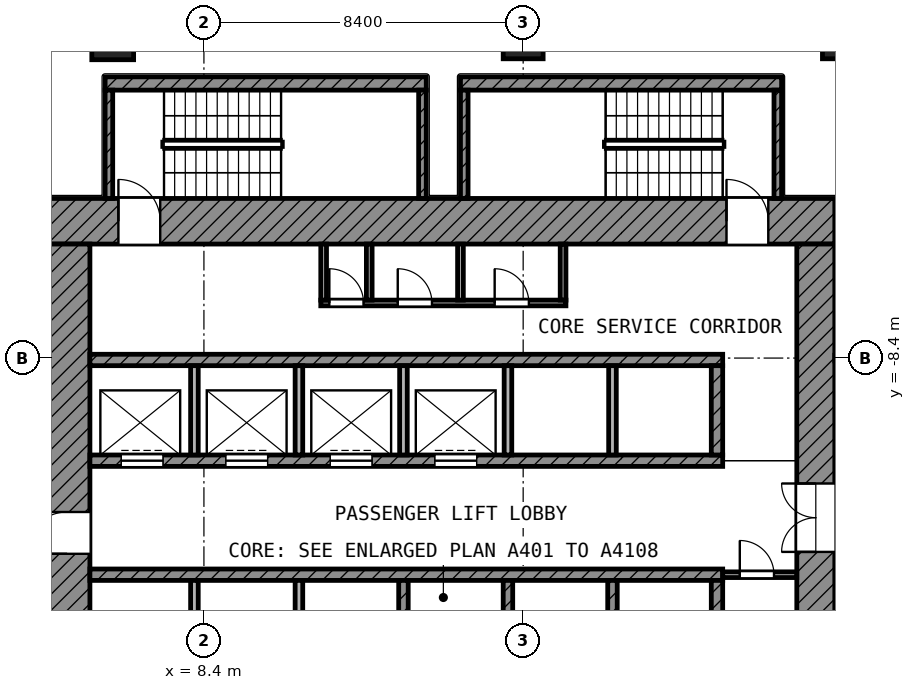
"""IFC4 building model, lengths in metres.
Left out: names, types, materials, properties, quantities, classifications, styles, units other than length and angle.
Written with IfcOpenShell. Run it as: python <this file> out.ifc"""

import sys

from ifc_helpers import new_model, si_unit, direction, frame, frame_2d, origin, origin_2d, place, context, subcontext, project, spatial, rectangle, extrude, element, fill, save


model = new_model("IFC4")
c1 = context("Model", 3, precision=1e-05, world=origin(), true_north=direction((0.0, 1.0)))
c2 = subcontext(c1, "Body", "Model", "MODEL_VIEW")
j1 = project(units=[si_unit("LENGTHUNIT", "METRE"), si_unit("PLANEANGLEUNIT", "RADIAN")], contexts=[c1])
p1 = place(None, origin())
s1 = spatial("IfcSite", under=j1, at=p1, CompositionType="ELEMENT")
p2 = place(p1, origin())
s2 = spatial("IfcBuilding", under=s1, at=p2, CompositionType="ELEMENT")
p3 = place(p2, frame((0.0, 0.0, 136.6)))
s3 = spatial("IfcBuildingStorey", under=s2, at=p3, CompositionType="ELEMENT", Elevation=136.6)
p4 = place(p3, frame((6.0, 0.0, 0.0), z_axis=(0.0, 0.0, 1.0), x_axis=(1.0, 0.0, 0.0)))
e1 = element("IfcColumn", 1, at=p4, inside=s3, PredefinedType="COLUMN", context=c2, shape_type="SweptSolid", body=[
    extrude(rectangle(XDim=1.1, YDim=1.1, at=origin_2d()), origin(), (0.0, 0.0, 1.0), 4.2),
])
for number, where, z_axis, x_axis in (
    (2, (16.8, 0.0, 0.0), (0.0, 0.0, 1.0), (1.0, 0.0, 0.0)),
    (3, (25.2, 0.0, 0.0), (0.0, 0.0, 1.0), (1.0, 0.0, 0.0)),
):
    element("IfcColumn", number, at=place(p3, frame(where, z_axis=z_axis, x_axis=x_axis)), inside=s3, PredefinedType="COLUMN", context=c2, shape_type="SweptSolid", body=[
        extrude(rectangle(XDim=1.05, YDim=1.05, at=origin_2d()), origin(), (0.0, 0.0, 1.0), 4.2),
    ])
p5 = place(p3, frame((4.2, -4.8, 0.0), z_axis=(0.0, 0.0, 1.0), x_axis=(1.0, 0.0, 0.0)))
e4 = element("IfcWall", 4, at=p5, inside=s3, PredefinedType="SHEAR", context=c2, shape_type="SweptSolid", body=[
    extrude(rectangle(XDim=20.8, YDim=1.2, at=frame_2d((10.4, 0.0))), origin(), (0.0, 0.0, 1.0), 3.6),
])
p6 = place(p5, frame((1.95, 0.0, 0.0)))
e5 = element("IfcOpeningElement", 5, at=p6, cuts=e4, PredefinedType="OPENING", context=c2, shape_type="SweptSolid", body=[
    extrude(rectangle(XDim=1.1, YDim=2.1, at=frame_2d((0.55, 1.05))), frame((0.0, 0.61, 0.0), z_axis=(0.0, -1.0, 0.0), x_axis=(1.0, 0.0, 0.0)), (0.0, 0.0, 1.0), 1.22),
])
p7 = place(p5, frame((17.95, 0.0, 0.0)))
e6 = element("IfcOpeningElement", 6, at=p7, cuts=e4, PredefinedType="OPENING", context=c2, shape_type="SweptSolid", body=[
    extrude(rectangle(XDim=1.1, YDim=2.1, at=frame_2d((0.55, 1.05))), frame((0.0, 0.61, 0.0), z_axis=(0.0, -1.0, 0.0), x_axis=(1.0, 0.0, 0.0)), (0.0, 0.0, 1.0), 1.22),
])
p8 = place(p3, frame((4.8, -25.0, 0.0), z_axis=(0.0, 0.0, 1.0), x_axis=(0.0, 1.0, 0.0)))
e7 = element("IfcWall", 7, at=p8, inside=s3, PredefinedType="SHEAR", context=c2, shape_type="SweptSolid", body=[
    extrude(rectangle(XDim=19.6, YDim=1.2, at=frame_2d((9.8, 0.0))), origin(), (0.0, 0.0, 1.0), 3.6),
])
p9 = place(p8, frame((11.45, 0.0, 0.0)))
e8 = element("IfcOpeningElement", 8, at=p9, cuts=e7, PredefinedType="OPENING", context=c2, shape_type="SweptSolid", body=[
    extrude(rectangle(XDim=1.1, YDim=2.1, at=frame_2d((0.55, 1.05))), frame((0.0, 0.61, 0.0), z_axis=(0.0, -1.0, 0.0), x_axis=(1.0, 0.0, 0.0)), (0.0, 0.0, 1.0), 1.22),
])
p10 = place(p8, frame((2.15, 0.0, 0.0)))
e9 = element("IfcOpeningElement", 9, at=p10, cuts=e7, PredefinedType="OPENING", context=c2, shape_type="SweptSolid", body=[
    extrude(rectangle(XDim=1.1, YDim=2.1, at=frame_2d((0.55, 1.05))), frame((0.0, 0.61, 0.0), z_axis=(0.0, -1.0, 0.0), x_axis=(1.0, 0.0, 0.0)), (0.0, 0.0, 1.0), 1.22),
])
p11 = place(p3, frame((24.5, -24.0, 0.0), z_axis=(0.0, 0.0, 1.0), x_axis=(0.0, 1.0, 0.0)))
e10 = element("IfcWall", 10, at=p11, inside=s3, PredefinedType="SHEAR", context=c2, shape_type="SweptSolid", body=[
    extrude(rectangle(XDim=18.6, YDim=1.0, at=frame_2d((9.3, 0.0))), origin(), (0.0, 0.0, 1.0), 3.6),
])
p12 = place(p11, frame((10.5, 0.0, 0.0)))
e11 = element("IfcOpeningElement", 11, at=p12, cuts=e10, PredefinedType="OPENING", context=c2, shape_type="SweptSolid", body=[
    extrude(rectangle(XDim=1.8, YDim=2.1, at=frame_2d((0.9, 1.05))), frame((0.0, 0.51, 0.0), z_axis=(0.0, -1.0, 0.0), x_axis=(1.0, 0.0, 0.0)), (0.0, 0.0, 1.0), 1.02),
])
p13 = place(p3, frame((5.4, -8.45, 0.0), z_axis=(0.0, 0.0, 1.0), x_axis=(1.0, 0.0, 0.0)))
e12 = element("IfcWall", 12, at=p13, inside=s3, PredefinedType="SHEAR", context=c2, shape_type="SweptSolid", body=[
    extrude(rectangle(XDim=16.65, YDim=0.3, at=frame_2d((8.325, 0.0))), origin(), (0.0, 0.0, 1.0), 3.6),
])
p14 = place(p3, frame((5.4, -11.1, 0.0), z_axis=(0.0, 0.0, 1.0), x_axis=(1.0, 0.0, 0.0)))
e13 = element("IfcWall", 13, at=p14, inside=s3, PredefinedType="SHEAR", context=c2, shape_type="SweptSolid", body=[
    extrude(rectangle(XDim=16.65, YDim=0.3, at=frame_2d((8.325, 0.0))), origin(), (0.0, 0.0, 1.0), 3.6),
])
p15 = place(p14, frame((0.825, 0.0, 0.0)))
e14 = element("IfcOpeningElement", 14, at=p15, cuts=e13, PredefinedType="OPENING", context=c2, shape_type="SweptSolid", body=[
    extrude(rectangle(XDim=1.1, YDim=2.1, at=frame_2d((0.55, 1.05))), frame((0.0, 0.16, 0.0), z_axis=(0.0, -1.0, 0.0), x_axis=(1.0, 0.0, 0.0)), (0.0, 0.0, 1.0), 0.32),
])
p16 = place(p14, frame((3.575, 0.0, 0.0)))
e15 = element("IfcOpeningElement", 15, at=p16, cuts=e13, PredefinedType="OPENING", context=c2, shape_type="SweptSolid", body=[
    extrude(rectangle(XDim=1.1, YDim=2.1, at=frame_2d((0.55, 1.05))), frame((0.0, 0.16, 0.0), z_axis=(0.0, -1.0, 0.0), x_axis=(1.0, 0.0, 0.0)), (0.0, 0.0, 1.0), 0.32),
])
p17 = place(p14, frame((6.325, 0.0, 0.0)))
e16 = element("IfcOpeningElement", 16, at=p17, cuts=e13, PredefinedType="OPENING", context=c2, shape_type="SweptSolid", body=[
    extrude(rectangle(XDim=1.1, YDim=2.1, at=frame_2d((0.55, 1.05))), frame((0.0, 0.16, 0.0), z_axis=(0.0, -1.0, 0.0), x_axis=(1.0, 0.0, 0.0)), (0.0, 0.0, 1.0), 0.32),
])
p18 = place(p14, frame((9.075, 0.0, 0.0)))
e17 = element("IfcOpeningElement", 17, at=p18, cuts=e13, PredefinedType="OPENING", context=c2, shape_type="SweptSolid", body=[
    extrude(rectangle(XDim=1.1, YDim=2.1, at=frame_2d((0.55, 1.05))), frame((0.0, 0.16, 0.0), z_axis=(0.0, -1.0, 0.0), x_axis=(1.0, 0.0, 0.0)), (0.0, 0.0, 1.0), 0.32),
])
p19 = place(p3, frame((5.4, -14.1, 0.0), z_axis=(0.0, 0.0, 1.0), x_axis=(1.0, 0.0, 0.0)))
e18 = element("IfcWall", 18, at=p19, inside=s3, PredefinedType="SHEAR", context=c2, shape_type="SweptSolid", body=[
    extrude(rectangle(XDim=16.65, YDim=0.3, at=frame_2d((8.325, 0.0))), origin(), (0.0, 0.0, 1.0), 3.6),
])
p20 = place(p3, frame((21.9, -10.95, 0.0), z_axis=(0.0, 0.0, 1.0), x_axis=(0.0, 1.0, 0.0)))
e19 = element("IfcWall", 19, at=p20, inside=s3, PredefinedType="SHEAR", context=c2, shape_type="SweptSolid", body=[
    extrude(rectangle(XDim=2.35, YDim=0.3, at=frame_2d((1.175, 0.0))), origin(), (0.0, 0.0, 1.0), 3.6),
])
p21 = place(p3, frame((21.9, -16.6, 0.0), z_axis=(0.0, 0.0, 1.0), x_axis=(0.0, 1.0, 0.0)))
e20 = element("IfcWall", 20, at=p21, inside=s3, PredefinedType="SHEAR", context=c2, shape_type="SweptSolid", body=[
    extrude(rectangle(XDim=2.35, YDim=0.3, at=frame_2d((1.175, 0.0))), origin(), (0.0, 0.0, 1.0), 3.6),
])
for number, where, z_axis, x_axis in (
    (21, (8.15, -10.95, 0.0), (0.0, 0.0, 1.0), (0.0, 1.0, 0.0)),
    (22, (10.9, -10.95, 0.0), (0.0, 0.0, 1.0), (0.0, 1.0, 0.0)),
    (23, (13.65, -10.95, 0.0), (0.0, 0.0, 1.0), (0.0, 1.0, 0.0)),
    (24, (16.4, -10.95, 0.0), (0.0, 0.0, 1.0), (0.0, 1.0, 0.0)),
    (25, (19.15, -10.95, 0.0), (0.0, 0.0, 1.0), (0.0, 1.0, 0.0)),
):
    element("IfcWall", number, at=place(p3, frame(where, z_axis=z_axis, x_axis=x_axis)), inside=s3, PredefinedType="PARTITIONING", context=c2, shape_type="SweptSolid", body=[
        extrude(rectangle(XDim=2.35, YDim=0.2, at=frame_2d((1.175, 0.0))), origin(), (0.0, 0.0, 1.0), 3.6),
    ])
for number, where, z_axis, x_axis in (
    (26, (8.15, -16.6, 0.0), (0.0, 0.0, 1.0), (0.0, 1.0, 0.0)),
    (27, (10.9, -16.6, 0.0), (0.0, 0.0, 1.0), (0.0, 1.0, 0.0)),
):
    element("IfcWall", number, at=place(p3, frame(where, z_axis=z_axis, x_axis=x_axis)), inside=s3, PredefinedType="PARTITIONING", context=c2, shape_type="SweptSolid", body=[
        extrude(rectangle(XDim=2.35, YDim=0.2, at=frame_2d((1.175, 0.0))), origin(), (0.0, 0.0, 1.0), 3.6),
    ])
for number, where, z_axis, x_axis in (
    (28, (13.65, -16.6, 0.0), (0.0, 0.0, 1.0), (0.0, 1.0, 0.0)),
    (29, (16.4, -16.6, 0.0), (0.0, 0.0, 1.0), (0.0, 1.0, 0.0)),
    (30, (19.15, -16.6, 0.0), (0.0, 0.0, 1.0), (0.0, 1.0, 0.0)),
):
    element("IfcWall", number, at=place(p3, frame(where, z_axis=z_axis, x_axis=x_axis)), inside=s3, PredefinedType="SHEAR", context=c2, shape_type="SweptSolid", body=[
        extrude(rectangle(XDim=2.35, YDim=0.25, at=frame_2d((1.175, 0.0))), origin(), (0.0, 0.0, 1.0), 3.6),
    ])
p22 = place(p3, frame((22.05, -14.1, 0.0), z_axis=(0.0, 0.0, 1.0), x_axis=(1.0, 0.0, 0.0)))
e31 = element("IfcWall", 31, at=p22, inside=s3, PredefinedType="PARTITIONING", context=c2, shape_type="SweptSolid", body=[
    extrude(rectangle(XDim=1.95, YDim=0.15, at=frame_2d((0.975, 0.0))), origin(), (0.0, 0.0, 1.0), 3.6),
])
p23 = place(p22, frame((0.45, 0.0, 0.0)))
e32 = element("IfcOpeningElement", 32, at=p23, cuts=e31, PredefinedType="OPENING", context=c2, shape_type="SweptSolid", body=[
    extrude(rectangle(XDim=0.9, YDim=2.1, at=frame_2d((0.45, 1.05))), frame((0.0, 0.085, 0.0), z_axis=(0.0, -1.0, 0.0), x_axis=(1.0, 0.0, 0.0)), (0.0, 0.0, 1.0), 0.17),
])
p24 = place(p3, frame((11.475, -6.95, 0.0), z_axis=(0.0, 0.0, 1.0), x_axis=(1.0, 0.0, 0.0)))
e33 = element("IfcWall", 33, at=p24, inside=s3, PredefinedType="PARTITIONING", context=c2, shape_type="SweptSolid", body=[
    extrude(rectangle(XDim=6.45, YDim=0.15, at=frame_2d((3.225, 0.0))), origin(), (0.0, 0.0, 1.0), 3.6),
])
p25 = place(p24, frame((0.225, 0.0, 0.0)))
e34 = element("IfcOpeningElement", 34, at=p25, cuts=e33, PredefinedType="OPENING", context=c2, shape_type="SweptSolid", body=[
    extrude(rectangle(XDim=0.9, YDim=2.1, at=frame_2d((0.45, 1.05))), frame((0.0, 0.085, 0.0), z_axis=(0.0, -1.0, 0.0), x_axis=(1.0, 0.0, 0.0)), (0.0, 0.0, 1.0), 0.17),
])
p26 = place(p24, frame((2.025, 0.0, 0.0)))
e35 = element("IfcOpeningElement", 35, at=p26, cuts=e33, PredefinedType="OPENING", context=c2, shape_type="SweptSolid", body=[
    extrude(rectangle(XDim=0.9, YDim=2.1, at=frame_2d((0.45, 1.05))), frame((0.0, 0.085, 0.0), z_axis=(0.0, -1.0, 0.0), x_axis=(1.0, 0.0, 0.0)), (0.0, 0.0, 1.0), 0.17),
])
p27 = place(p24, frame((4.575, 0.0, 0.0)))
e36 = element("IfcOpeningElement", 36, at=p27, cuts=e33, PredefinedType="OPENING", context=c2, shape_type="SweptSolid", body=[
    extrude(rectangle(XDim=0.9, YDim=2.1, at=frame_2d((0.45, 1.05))), frame((0.0, 0.085, 0.0), z_axis=(0.0, -1.0, 0.0), x_axis=(1.0, 0.0, 0.0)), (0.0, 0.0, 1.0), 0.17),
])
for number, where, z_axis, x_axis in (
    (37, (11.55, -6.875, 0.0), (0.0, 0.0, 1.0), (0.0, 1.0, 0.0)),
    (38, (12.75, -6.875, 0.0), (0.0, 0.0, 1.0), (0.0, 1.0, 0.0)),
    (39, (15.15, -6.875, 0.0), (0.0, 0.0, 1.0), (0.0, 1.0, 0.0)),
    (40, (17.85, -6.875, 0.0), (0.0, 0.0, 1.0), (0.0, 1.0, 0.0)),
):
    element("IfcWall", number, at=place(p3, frame(where, z_axis=z_axis, x_axis=x_axis)), inside=s3, PredefinedType="PARTITIONING", context=c2, shape_type="SweptSolid", body=[
        extrude(rectangle(XDim=1.475, YDim=0.15, at=frame_2d((0.738, 0.0))), origin(), (0.0, 0.0, 1.0), 3.6),
    ])
p28 = place(p3, frame((5.8, -1.175, 0.0), z_axis=(0.0, 0.0, 1.0), x_axis=(1.0, 0.0, 0.0)))
e41 = element("IfcWall", 41, at=p28, inside=s3, PredefinedType="SHEAR", context=c2, shape_type="SweptSolid", body=[
    extrude(rectangle(XDim=8.45, YDim=0.35, at=frame_2d((4.225, 0.0))), origin(), (0.0, 0.0, 1.0), 3.6),
])
for number, where, z_axis, x_axis in (
    (42, (5.9, -4.2, 0.0), (0.0, 0.0, 1.0), (0.0, 1.0, 0.0)),
    (43, (14.15, -4.2, 0.0), (0.0, 0.0, 1.0), (0.0, 1.0, 0.0)),
):
    element("IfcWall", number, at=place(p3, frame(where, z_axis=z_axis, x_axis=x_axis)), inside=s3, PredefinedType="SHEAR", context=c2, shape_type="SweptSolid", body=[
        extrude(rectangle(XDim=2.85, YDim=0.2, at=frame_2d((1.425, 0.0))), origin(), (0.0, 0.0, 1.0), 3.6),
    ])
p29 = place(p3, frame((15.15, -1.175, 0.0), z_axis=(0.0, 0.0, 1.0), x_axis=(1.0, 0.0, 0.0)))
e44 = element("IfcWall", 44, at=p29, inside=s3, PredefinedType="SHEAR", context=c2, shape_type="SweptSolid", body=[
    extrude(rectangle(XDim=8.45, YDim=0.35, at=frame_2d((4.225, 0.0))), origin(), (0.0, 0.0, 1.0), 3.6),
])
for number, where, z_axis, x_axis in (
    (45, (15.25, -4.2, 0.0), (0.0, 0.0, 1.0), (0.0, 1.0, 0.0)),
    (46, (23.5, -4.2, 0.0), (0.0, 0.0, 1.0), (0.0, 1.0, 0.0)),
):
    element("IfcWall", number, at=place(p3, frame(where, z_axis=z_axis, x_axis=x_axis)), inside=s3, PredefinedType="SHEAR", context=c2, shape_type="SweptSolid", body=[
        extrude(rectangle(XDim=2.85, YDim=0.2, at=frame_2d((1.425, 0.0))), origin(), (0.0, 0.0, 1.0), 3.6),
    ])
p30 = place(p15, origin())
e47 = element("IfcDoor", 47, at=p30, inside=s3, OperationType="DOUBLE_DOOR_SLIDING", PredefinedType="DOOR", context=c2, shape_type="SweptSolid", body=[
    extrude(rectangle(XDim=1.1, YDim=2.1, at=frame_2d((0.55, 1.05))), frame((0.0, 0.025, 0.0), z_axis=(0.0, -1.0, 0.0), x_axis=(1.0, 0.0, 0.0)), (0.0, 0.0, 1.0), 0.05),
])
fill(e14, e47)
p31 = place(p16, origin())
e48 = element("IfcDoor", 48, at=p31, inside=s3, OperationType="DOUBLE_DOOR_SLIDING", PredefinedType="DOOR", context=c2, shape_type="SweptSolid", body=[
    extrude(rectangle(XDim=1.1, YDim=2.1, at=frame_2d((0.55, 1.05))), frame((0.0, 0.025, 0.0), z_axis=(0.0, -1.0, 0.0), x_axis=(1.0, 0.0, 0.0)), (0.0, 0.0, 1.0), 0.05),
])
fill(e15, e48)
p32 = place(p17, origin())
e49 = element("IfcDoor", 49, at=p32, inside=s3, OperationType="DOUBLE_DOOR_SLIDING", PredefinedType="DOOR", context=c2, shape_type="SweptSolid", body=[
    extrude(rectangle(XDim=1.1, YDim=2.1, at=frame_2d((0.55, 1.05))), frame((0.0, 0.025, 0.0), z_axis=(0.0, -1.0, 0.0), x_axis=(1.0, 0.0, 0.0)), (0.0, 0.0, 1.0), 0.05),
])
fill(e16, e49)
p33 = place(p18, origin())
e50 = element("IfcDoor", 50, at=p33, inside=s3, OperationType="DOUBLE_DOOR_SLIDING", PredefinedType="DOOR", context=c2, shape_type="SweptSolid", body=[
    extrude(rectangle(XDim=1.1, YDim=2.1, at=frame_2d((0.55, 1.05))), frame((0.0, 0.025, 0.0), z_axis=(0.0, -1.0, 0.0), x_axis=(1.0, 0.0, 0.0)), (0.0, 0.0, 1.0), 0.05),
])
fill(e17, e50)
p34 = place(p9, origin())
e51 = element("IfcDoor", 51, at=p34, inside=s3, OperationType="SINGLE_SWING_LEFT", PredefinedType="DOOR", context=c2, shape_type="SweptSolid", body=[
    extrude(rectangle(XDim=1.1, YDim=2.1, at=frame_2d((0.55, 1.05))), frame((0.0, 0.025, 0.0), z_axis=(0.0, -1.0, 0.0), x_axis=(1.0, 0.0, 0.0)), (0.0, 0.0, 1.0), 0.05),
])
fill(e8, e51)
p35 = place(p6, origin())
e52 = element("IfcDoor", 52, at=p35, inside=s3, OperationType="SINGLE_SWING_LEFT", PredefinedType="DOOR", context=c2, shape_type="SweptSolid", body=[
    extrude(rectangle(XDim=1.1, YDim=2.1, at=frame_2d((0.55, 1.05))), frame((0.0, 0.025, 0.0), z_axis=(0.0, -1.0, 0.0), x_axis=(1.0, 0.0, 0.0)), (0.0, 0.0, 1.0), 0.05),
])
fill(e5, e52)
p36 = place(p7, origin())
e53 = element("IfcDoor", 53, at=p36, inside=s3, OperationType="SINGLE_SWING_LEFT", PredefinedType="DOOR", context=c2, shape_type="SweptSolid", body=[
    extrude(rectangle(XDim=1.1, YDim=2.1, at=frame_2d((0.55, 1.05))), frame((0.0, 0.025, 0.0), z_axis=(0.0, -1.0, 0.0), x_axis=(1.0, 0.0, 0.0)), (0.0, 0.0, 1.0), 0.05),
])
fill(e6, e53)
p37 = place(p12, origin())
e54 = element("IfcDoor", 54, at=p37, inside=s3, OperationType="DOUBLE_DOOR_SINGLE_SWING", PredefinedType="DOOR", context=c2, shape_type="SweptSolid", body=[
    extrude(rectangle(XDim=1.8, YDim=2.1, at=frame_2d((0.9, 1.05))), frame((0.0, 0.025, 0.0), z_axis=(0.0, -1.0, 0.0), x_axis=(1.0, 0.0, 0.0)), (0.0, 0.0, 1.0), 0.05),
])
fill(e11, e54)
p38 = place(p25, origin())
e55 = element("IfcDoor", 55, at=p38, inside=s3, OperationType="SINGLE_SWING_LEFT", PredefinedType="DOOR", context=c2, shape_type="SweptSolid", body=[
    extrude(rectangle(XDim=0.9, YDim=2.1, at=frame_2d((0.45, 1.05))), frame((0.0, 0.025, 0.0), z_axis=(0.0, -1.0, 0.0), x_axis=(1.0, 0.0, 0.0)), (0.0, 0.0, 1.0), 0.05),
])
fill(e34, e55)
p39 = place(p26, origin())
e56 = element("IfcDoor", 56, at=p39, inside=s3, OperationType="SINGLE_SWING_LEFT", PredefinedType="DOOR", context=c2, shape_type="SweptSolid", body=[
    extrude(rectangle(XDim=0.9, YDim=2.1, at=frame_2d((0.45, 1.05))), frame((0.0, 0.025, 0.0), z_axis=(0.0, -1.0, 0.0), x_axis=(1.0, 0.0, 0.0)), (0.0, 0.0, 1.0), 0.05),
])
fill(e35, e56)
p40 = place(p27, origin())
e57 = element("IfcDoor", 57, at=p40, inside=s3, OperationType="SINGLE_SWING_LEFT", PredefinedType="DOOR", context=c2, shape_type="SweptSolid", body=[
    extrude(rectangle(XDim=0.9, YDim=2.1, at=frame_2d((0.45, 1.05))), frame((0.0, 0.025, 0.0), z_axis=(0.0, -1.0, 0.0), x_axis=(1.0, 0.0, 0.0)), (0.0, 0.0, 1.0), 0.05),
])
fill(e36, e57)
p41 = place(p23, origin())
e58 = element("IfcDoor", 58, at=p41, inside=s3, OperationType="SINGLE_SWING_LEFT", PredefinedType="DOOR", context=c2, shape_type="SweptSolid", body=[
    extrude(rectangle(XDim=0.9, YDim=2.1, at=frame_2d((0.45, 1.05))), frame((0.0, 0.025, 0.0), z_axis=(0.0, -1.0, 0.0), x_axis=(1.0, 0.0, 0.0)), (0.0, 0.0, 1.0), 0.05),
])
fill(e32, e58)
save(model, sys.argv[1])
